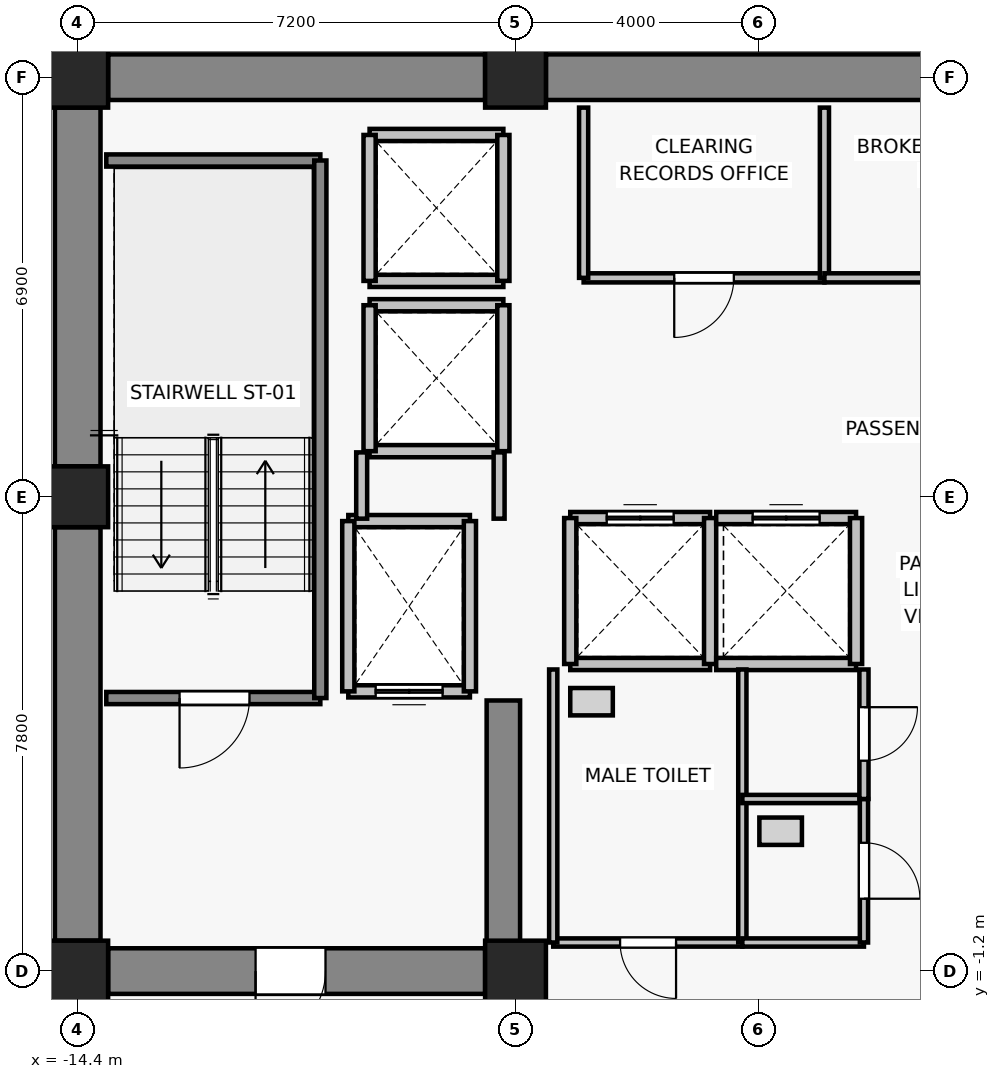
"""IFC4 building model, lengths in metres.
Left out: names, types, materials, properties, quantities, classifications, styles, units other than length and angle.
Written with IfcOpenShell. Run it as: python <this file> out.ifc"""

import sys

from ifc_helpers import new_model, si_unit, direction, frame, frame_2d, origin, origin_2d, place, context, subcontext, project, spatial, rectangle, extrude, source, transform, mapped, element, fill, save


model = new_model("IFC4")
c1 = context("Model", 3, precision=1e-05, world=origin(), true_north=direction((0.0, 1.0)))
c2 = subcontext(c1, "Body", "Model", "MODEL_VIEW")
j1 = project(units=[si_unit("LENGTHUNIT", "METRE"), si_unit("PLANEANGLEUNIT", "RADIAN")], contexts=[c1])
p1 = place(None, origin())
s1 = spatial("IfcSite", under=j1, at=p1, CompositionType="ELEMENT")
p2 = place(p1, origin())
s2 = spatial("IfcBuilding", under=s1, at=p2, CompositionType="ELEMENT")
p3 = place(p2, frame((0.0, 0.0, 192.4)))
s3 = spatial("IfcBuildingStorey", under=s2, at=p3, CompositionType="ELEMENT", Elevation=192.4)
for number, where, z_axis, x_axis in (
    (1, (-14.4, -1.2, 0.0), (0.0, 0.0, 1.0), (1.0, 0.0, 0.0)),
    (2, (-7.2, -1.2, 0.0), (0.0, 0.0, 1.0), (1.0, 0.0, 0.0)),
    (3, (-14.4, 6.6, 0.0), (0.0, 0.0, 1.0), (1.0, 0.0, 0.0)),
    (4, (-14.4, 13.5, 0.0), (0.0, 0.0, 1.0), (1.0, 0.0, 0.0)),
    (5, (-7.2, 13.5, 0.0), (0.0, 0.0, 1.0), (1.0, 0.0, 0.0)),
):
    element("IfcColumn", number, at=place(p3, frame(where, z_axis=z_axis, x_axis=x_axis)), inside=s3, PredefinedType="COLUMN", context=c2, shape_type="SweptSolid", body=[
        extrude(rectangle(XDim=1.0, YDim=1.0, at=origin_2d()), origin(), (0.0, 0.0, 1.0), 3.3),
    ])
p4 = place(p3, frame((-13.9, 13.5, 0.0), z_axis=(0.0, 0.0, 1.0), x_axis=(1.0, 0.0, 0.0)))
e6 = element("IfcWall", 6, at=p4, inside=s3, PredefinedType="SHEAR", context=c2, shape_type="SweptSolid", body=[
    extrude(rectangle(XDim=6.2, YDim=0.75, at=frame_2d((3.1, 0.0))), origin(), (0.0, 0.0, 1.0), 3.075),
])
p5 = place(p3, frame((-6.7, 13.5, 0.0), z_axis=(0.0, 0.0, 1.0), x_axis=(1.0, 0.0, 0.0)))
e7 = element("IfcWall", 7, at=p5, inside=s3, PredefinedType="SHEAR", context=c2, shape_type="SweptSolid", body=[
    extrude(rectangle(XDim=13.4, YDim=0.75, at=frame_2d((6.7, 0.0))), origin(), (0.0, 0.0, 1.0), 3.075),
])
p6 = place(p3, frame((-14.4, -0.7, 0.0), z_axis=(0.0, 0.0, 1.0), x_axis=(0.0, 1.0, 0.0)))
e8 = element("IfcWall", 8, at=p6, inside=s3, PredefinedType="SHEAR", context=c2, shape_type="SweptSolid", body=[
    extrude(rectangle(XDim=6.8, YDim=0.75, at=frame_2d((3.4, 0.0))), origin(), (0.0, 0.0, 1.0), 3.075),
])
p7 = place(p3, frame((-14.4, 7.1, 0.0), z_axis=(0.0, 0.0, 1.0), x_axis=(0.0, 1.0, 0.0)))
e9 = element("IfcWall", 9, at=p7, inside=s3, PredefinedType="SHEAR", context=c2, shape_type="SweptSolid", body=[
    extrude(rectangle(XDim=5.9, YDim=0.75, at=frame_2d((2.95, 0.0))), origin(), (0.0, 0.0, 1.0), 3.075),
])
p8 = place(p3, frame((-7.7, -1.2, 0.0), z_axis=(0.0, 0.0, 1.0), x_axis=(-1.0, 0.0, 0.0)))
e10 = element("IfcWall", 10, at=p8, inside=s3, PredefinedType="SHEAR", context=c2, shape_type="SweptSolid", body=[
    extrude(rectangle(XDim=6.2, YDim=0.75, at=frame_2d((3.1, 0.0))), origin(), (0.0, 0.0, 1.0), 3.075),
])
p9 = place(p8, frame((2.625, 0.0, 0.0)))
e11 = element("IfcOpeningElement", 11, at=p9, cuts=e10, PredefinedType="OPENING", context=c2, shape_type="SweptSolid", body=[
    extrude(rectangle(XDim=1.15, YDim=2.15, at=frame_2d((0.575, 1.075))), frame((0.0, 0.385, 0.0), z_axis=(0.0, -1.0, 0.0), x_axis=(1.0, 0.0, 0.0)), (0.0, 0.0, 1.0), 0.77),
])
p10 = place(p3, frame((-7.4, -0.825, 0.0), z_axis=(0.0, 0.0, 1.0), x_axis=(0.0, 1.0, 0.0)))
e12 = element("IfcWall", 12, at=p10, inside=s3, PredefinedType="SHEAR", context=c2, shape_type="SweptSolid", body=[
    extrude(rectangle(XDim=4.075, YDim=0.55, at=frame_2d((2.038, 0.0))), origin(), (0.0, 0.0, 1.0), 3.075),
])
p11 = place(p3, frame((-7.95, 3.4, 0.0), z_axis=(0.0, 0.0, 1.0), x_axis=(-1.0, 0.0, 0.0)))
e13 = element("IfcWall", 13, at=p11, inside=s3, PredefinedType="SOLIDWALL", context=c2, shape_type="SweptSolid", body=[
    extrude(rectangle(XDim=2.0, YDim=0.2, at=frame_2d((1.0, 0.0))), origin(), (0.0, 0.0, 1.0), 3.075),
])
p12 = place(p11, frame((0.45, 0.0, 0.0)))
e14 = element("IfcOpeningElement", 14, at=p12, cuts=e13, PredefinedType="OPENING", context=c2, shape_type="SweptSolid", body=[
    extrude(rectangle(XDim=1.1, YDim=2.2, at=frame_2d((0.55, 1.1))), frame((0.0, 0.11, 0.0), z_axis=(0.0, -1.0, 0.0), x_axis=(1.0, 0.0, 0.0)), (0.0, 0.0, 1.0), 0.22),
])
p13 = place(p3, frame((-9.95, 6.2, 0.0), z_axis=(0.0, 0.0, 1.0), x_axis=(1.0, 0.0, 0.0)))
e15 = element("IfcWall", 15, at=p13, inside=s3, PredefinedType="SOLIDWALL", context=c2, shape_type="SweptSolid", body=[
    extrude(rectangle(XDim=2.0, YDim=0.2, at=frame_2d((1.0, 0.0))), origin(), (0.0, 0.0, 1.0), 3.075),
])
for number, where, z_axis, x_axis in (
    (16, (-9.95, 3.4, 0.0), (0.0, 0.0, 1.0), (0.0, 1.0, 0.0)),
    (17, (-7.95, 6.2, 0.0), (0.0, 0.0, 1.0), (0.0, -1.0, 0.0)),
):
    element("IfcWall", number, at=place(p3, frame(where, z_axis=z_axis, x_axis=x_axis)), inside=s3, PredefinedType="SOLIDWALL", context=c2, shape_type="SweptSolid", body=[
        extrude(rectangle(XDim=2.8, YDim=0.2, at=frame_2d((1.4, 0.0))), origin(), (0.0, 0.0, 1.0), 3.075),
    ])
p14 = place(p3, frame((-4.0, 3.85, 0.0), z_axis=(0.0, 0.0, 1.0), x_axis=(-1.0, 0.0, 0.0)))
e18 = element("IfcWall", 18, at=p14, inside=s3, PredefinedType="SOLIDWALL", context=c2, shape_type="SweptSolid", body=[
    extrude(rectangle(XDim=2.3, YDim=0.2, at=frame_2d((1.15, 0.0))), origin(), (0.0, 0.0, 1.0), 3.075),
])
p15 = place(p3, frame((-6.3, 6.25, 0.0), z_axis=(0.0, 0.0, 1.0), x_axis=(1.0, 0.0, 0.0)))
e19 = element("IfcWall", 19, at=p15, inside=s3, PredefinedType="SOLIDWALL", context=c2, shape_type="SweptSolid", body=[
    extrude(rectangle(XDim=2.3, YDim=0.2, at=frame_2d((1.15, 0.0))), origin(), (0.0, 0.0, 1.0), 3.075),
])
p16 = place(p15, frame((0.6, 0.0, 0.0)))
e20 = element("IfcOpeningElement", 20, at=p16, cuts=e19, PredefinedType="OPENING", context=c2, shape_type="SweptSolid", body=[
    extrude(rectangle(XDim=1.1, YDim=2.2, at=frame_2d((0.55, 1.1))), frame((0.0, 0.11, 0.0), z_axis=(0.0, -1.0, 0.0), x_axis=(1.0, 0.0, 0.0)), (0.0, 0.0, 1.0), 0.22),
])
for number, where, z_axis, x_axis in (
    (21, (-6.3, 3.85, 0.0), (0.0, 0.0, 1.0), (0.0, 1.0, 0.0)),
    (22, (-4.0, 6.25, 0.0), (0.0, 0.0, 1.0), (0.0, -1.0, 0.0)),
):
    element("IfcWall", number, at=place(p3, frame(where, z_axis=z_axis, x_axis=x_axis)), inside=s3, PredefinedType="SOLIDWALL", context=c2, shape_type="SweptSolid", body=[
        extrude(rectangle(XDim=2.4, YDim=0.2, at=frame_2d((1.2, 0.0))), origin(), (0.0, 0.0, 1.0), 3.075),
    ])
p17 = place(p3, frame((-1.6, 3.85, 0.0), z_axis=(0.0, 0.0, 1.0), x_axis=(-1.0, 0.0, 0.0)))
e23 = element("IfcWall", 23, at=p17, inside=s3, PredefinedType="SOLIDWALL", context=c2, shape_type="SweptSolid", body=[
    extrude(rectangle(XDim=2.3, YDim=0.2, at=frame_2d((1.15, 0.0))), origin(), (0.0, 0.0, 1.0), 3.075),
])
p18 = place(p3, frame((-3.9, 6.25, 0.0), z_axis=(0.0, 0.0, 1.0), x_axis=(1.0, 0.0, 0.0)))
e24 = element("IfcWall", 24, at=p18, inside=s3, PredefinedType="SOLIDWALL", context=c2, shape_type="SweptSolid", body=[
    extrude(rectangle(XDim=2.3, YDim=0.2, at=frame_2d((1.15, 0.0))), origin(), (0.0, 0.0, 1.0), 3.075),
])
p19 = place(p18, frame((0.6, 0.0, 0.0)))
e25 = element("IfcOpeningElement", 25, at=p19, cuts=e24, PredefinedType="OPENING", context=c2, shape_type="SweptSolid", body=[
    extrude(rectangle(XDim=1.1, YDim=2.2, at=frame_2d((0.55, 1.1))), frame((0.0, 0.11, 0.0), z_axis=(0.0, -1.0, 0.0), x_axis=(1.0, 0.0, 0.0)), (0.0, 0.0, 1.0), 0.22),
])
p20 = place(p3, frame((-1.6, 6.25, 0.0), z_axis=(0.0, 0.0, 1.0), x_axis=(0.0, -1.0, 0.0)))
e26 = element("IfcWall", 26, at=p20, inside=s3, PredefinedType="SOLIDWALL", context=c2, shape_type="SweptSolid", body=[
    extrude(rectangle(XDim=2.4, YDim=0.2, at=frame_2d((1.2, 0.0))), origin(), (0.0, 0.0, 1.0), 3.075),
])
for number, where, z_axis, x_axis in (
    (27, (-7.4, 7.35, 0.0), (0.0, 0.0, 1.0), (-1.0, 0.0, 0.0)),
    (28, (-9.6, 9.75, 0.0), (0.0, 0.0, 1.0), (1.0, 0.0, 0.0)),
):
    element("IfcWall", number, at=place(p3, frame(where, z_axis=z_axis, x_axis=x_axis)), inside=s3, PredefinedType="SOLIDWALL", context=c2, shape_type="SweptSolid", body=[
        extrude(rectangle(XDim=2.2, YDim=0.2, at=frame_2d((1.1, 0.0))), origin(), (0.0, 0.0, 1.0), 2.565),
    ])
p21 = place(p3, frame((-9.6, 7.35, 0.0), z_axis=(0.0, 0.0, 1.0), x_axis=(0.0, 1.0, 0.0)))
e29 = element("IfcWall", 29, at=p21, inside=s3, PredefinedType="SOLIDWALL", context=c2, shape_type="SweptSolid", body=[
    extrude(rectangle(XDim=2.4, YDim=0.2, at=frame_2d((1.2, 0.0))), origin(), (0.0, 0.0, 1.0), 3.075),
])
p22 = place(p3, frame((-7.4, 9.75, 0.0), z_axis=(0.0, 0.0, 1.0), x_axis=(0.0, -1.0, 0.0)))
e30 = element("IfcWall", 30, at=p22, inside=s3, PredefinedType="SOLIDWALL", context=c2, shape_type="SweptSolid", body=[
    extrude(rectangle(XDim=2.4, YDim=0.2, at=frame_2d((1.2, 0.0))), origin(), (0.0, 0.0, 1.0), 2.565),
])
for number, where, z_axis, x_axis in (
    (31, (-7.4, 10.15, 0.0), (0.0, 0.0, 1.0), (-1.0, 0.0, 0.0)),
    (32, (-9.6, 12.55, 0.0), (0.0, 0.0, 1.0), (1.0, 0.0, 0.0)),
):
    element("IfcWall", number, at=place(p3, frame(where, z_axis=z_axis, x_axis=x_axis)), inside=s3, PredefinedType="SOLIDWALL", context=c2, shape_type="SweptSolid", body=[
        extrude(rectangle(XDim=2.2, YDim=0.2, at=frame_2d((1.1, 0.0))), origin(), (0.0, 0.0, 1.0), 2.565),
    ])
p23 = place(p3, frame((-9.6, 10.15, 0.0), z_axis=(0.0, 0.0, 1.0), x_axis=(0.0, 1.0, 0.0)))
e33 = element("IfcWall", 33, at=p23, inside=s3, PredefinedType="SOLIDWALL", context=c2, shape_type="SweptSolid", body=[
    extrude(rectangle(XDim=2.4, YDim=0.2, at=frame_2d((1.2, 0.0))), origin(), (0.0, 0.0, 1.0), 3.075),
])
p24 = place(p3, frame((-7.4, 12.55, 0.0), z_axis=(0.0, 0.0, 1.0), x_axis=(0.0, -1.0, 0.0)))
e34 = element("IfcWall", 34, at=p24, inside=s3, PredefinedType="SOLIDWALL", context=c2, shape_type="SweptSolid", body=[
    extrude(rectangle(XDim=2.4, YDim=0.2, at=frame_2d((1.2, 0.0))), origin(), (0.0, 0.0, 1.0), 2.565),
])
p25 = place(p3, frame((-10.41, 3.29, 0.0), z_axis=(0.0, 0.0, 1.0), x_axis=(-1.0, 0.0, 0.0)))
e35 = element("IfcWall", 35, at=p25, inside=s3, PredefinedType="SOLIDWALL", context=c2, shape_type="SweptSolid", body=[
    extrude(rectangle(XDim=3.52, YDim=0.2, at=frame_2d((1.76, 0.0))), origin(), (0.0, 0.0, 1.0), 3.075),
])
p26 = place(p25, frame((1.165, 0.0, 0.0)))
e36 = element("IfcOpeningElement", 36, at=p26, cuts=e35, PredefinedType="OPENING", context=c2, shape_type="SweptSolid", body=[
    extrude(rectangle(XDim=1.15, YDim=2.15, at=frame_2d((0.575, 1.075))), frame((0.0, 0.11, 0.0), z_axis=(0.0, -1.0, 0.0), x_axis=(1.0, 0.0, 0.0)), (0.0, 0.0, 1.0), 0.22),
])
p27 = place(p3, frame((-13.93, 12.13, 0.0), z_axis=(0.0, 0.0, 1.0), x_axis=(1.0, 0.0, 0.0)))
e37 = element("IfcWall", 37, at=p27, inside=s3, PredefinedType="SOLIDWALL", context=c2, shape_type="SweptSolid", body=[
    extrude(rectangle(XDim=3.52, YDim=0.2, at=frame_2d((1.76, 0.0))), origin(), (0.0, 0.0, 1.0), 3.075),
])
p28 = place(p3, frame((-10.41, 12.13, 0.0), z_axis=(0.0, 0.0, 1.0), x_axis=(0.0, -1.0, 0.0)))
e38 = element("IfcWall", 38, at=p28, inside=s3, PredefinedType="SOLIDWALL", context=c2, shape_type="SweptSolid", body=[
    extrude(rectangle(XDim=8.84, YDim=0.2, at=frame_2d((4.42, 0.0))), origin(), (0.0, 0.0, 1.0), 3.075),
])
p29 = place(p3, frame((-9.73, 6.24, 0.0), z_axis=(0.0, 0.0, 1.0), x_axis=(0.0, 1.0, 0.0)))
e39 = element("IfcWall", 39, at=p29, inside=s3, PredefinedType="PARTITIONING", context=c2, shape_type="SweptSolid", body=[
    extrude(rectangle(XDim=1.09, YDim=0.18, at=frame_2d((0.545, 0.0))), origin(), (0.0, 0.0, 1.0), 3.075),
])
p30 = place(p3, frame((-7.47, 7.33, 0.0), z_axis=(0.0, 0.0, 1.0), x_axis=(0.0, -1.0, 0.0)))
e40 = element("IfcWall", 40, at=p30, inside=s3, PredefinedType="PARTITIONING", context=c2, shape_type="SweptSolid", body=[
    extrude(rectangle(XDim=1.09, YDim=0.18, at=frame_2d((0.545, 0.0))), origin(), (0.0, 0.0, 1.0), 2.565),
])
p31 = place(p3, frame((-2.12, 10.2, 0.0), z_axis=(0.0, 0.0, 1.0), x_axis=(-1.0, 0.0, 0.0)))
e41 = element("IfcWall", 41, at=p31, inside=s3, PredefinedType="PARTITIONING", context=c2, shape_type="SweptSolid", body=[
    extrude(rectangle(XDim=3.96, YDim=0.15, at=frame_2d((1.98, 0.0))), origin(), (0.0, 0.0, 1.0), 3.075),
])
p32 = place(p31, frame((1.49, 0.0, 0.0)))
e42 = element("IfcOpeningElement", 42, at=p32, cuts=e41, PredefinedType="OPENING", context=c2, shape_type="SweptSolid", body=[
    extrude(rectangle(XDim=0.98, YDim=2.15, at=frame_2d((0.49, 1.075))), frame((0.0, 0.085, 0.0), z_axis=(0.0, -1.0, 0.0), x_axis=(1.0, 0.0, 0.0)), (0.0, 0.0, 1.0), 0.17),
])
for number, where, z_axis, x_axis in (
    (43, (-6.08, 10.2, 0.0), (0.0, 0.0, 1.0), (0.0, 1.0, 0.0)),
    (44, (-2.12, 13.0, 0.0), (0.0, 0.0, 1.0), (0.0, -1.0, 0.0)),
):
    element("IfcWall", number, at=place(p3, frame(where, z_axis=z_axis, x_axis=x_axis)), inside=s3, PredefinedType="PARTITIONING", context=c2, shape_type="SweptSolid", body=[
        extrude(rectangle(XDim=2.8, YDim=0.15, at=frame_2d((1.4, 0.0))), origin(), (0.0, 0.0, 1.0), 3.075),
    ])
p33 = place(p3, frame((2.04, 10.2, 0.0), z_axis=(0.0, 0.0, 1.0), x_axis=(-1.0, 0.0, 0.0)))
e45 = element("IfcWall", 45, at=p33, inside=s3, PredefinedType="PARTITIONING", context=c2, shape_type="SweptSolid", body=[
    extrude(rectangle(XDim=4.16, YDim=0.15, at=frame_2d((2.08, 0.0))), origin(), (0.0, 0.0, 1.0), 3.075),
])
p34 = place(p33, frame((1.55, 0.0, 0.0)))
e46 = element("IfcOpeningElement", 46, at=p34, cuts=e45, PredefinedType="OPENING", context=c2, shape_type="SweptSolid", body=[
    extrude(rectangle(XDim=0.98, YDim=2.15, at=frame_2d((0.49, 1.075))), frame((0.0, 0.085, 0.0), z_axis=(0.0, -1.0, 0.0), x_axis=(1.0, 0.0, 0.0)), (0.0, 0.0, 1.0), 0.17),
])
p35 = place(p3, frame((-3.47, -0.73, 0.0), z_axis=(0.0, 0.0, 1.0), x_axis=(-1.0, 0.0, 0.0)))
e47 = element("IfcWall", 47, at=p35, inside=s3, PredefinedType="PARTITIONING", context=c2, shape_type="SweptSolid", body=[
    extrude(rectangle(XDim=3.11, YDim=0.135, at=frame_2d((1.555, 0.0))), origin(), (0.0, 0.0, 1.0), 3.075),
])
p36 = place(p35, frame((1.09, 0.0, 0.0)))
e48 = element("IfcOpeningElement", 48, at=p36, cuts=e47, PredefinedType="OPENING", context=c2, shape_type="SweptSolid", body=[
    extrude(rectangle(XDim=0.92, YDim=2.1, at=frame_2d((0.46, 1.05))), frame((0.0, 0.077, 0.0), z_axis=(0.0, -1.0, 0.0), x_axis=(1.0, 0.0, 0.0)), (0.0, 0.0, 1.0), 0.155),
])
for number, where, z_axis, x_axis in (
    (49, (-6.58, -0.73, 0.0), (0.0, 0.0, 1.0), (0.0, 1.0, 0.0)),
    (50, (-3.47, 3.76, 0.0), (0.0, 0.0, 1.0), (0.0, -1.0, 0.0)),
):
    element("IfcWall", number, at=place(p3, frame(where, z_axis=z_axis, x_axis=x_axis)), inside=s3, PredefinedType="PARTITIONING", context=c2, shape_type="SweptSolid", body=[
        extrude(rectangle(XDim=4.49, YDim=0.135, at=frame_2d((2.245, 0.0))), origin(), (0.0, 0.0, 1.0), 3.075),
    ])
for number, where, z_axis, x_axis in (
    (51, (-1.47, -0.73, 0.0), (0.0, 0.0, 1.0), (-1.0, 0.0, 0.0)),
    (52, (-3.47, 1.63, 0.0), (0.0, 0.0, 1.0), (1.0, 0.0, 0.0)),
):
    element("IfcWall", number, at=place(p3, frame(where, z_axis=z_axis, x_axis=x_axis)), inside=s3, PredefinedType="PARTITIONING", context=c2, shape_type="SweptSolid", body=[
        extrude(rectangle(XDim=2.0, YDim=0.135, at=frame_2d((1.0, 0.0))), origin(), (0.0, 0.0, 1.0), 3.075),
    ])
p37 = place(p3, frame((-1.47, 1.63, 0.0), z_axis=(0.0, 0.0, 1.0), x_axis=(0.0, -1.0, 0.0)))
e53 = element("IfcWall", 53, at=p37, inside=s3, PredefinedType="PARTITIONING", context=c2, shape_type="SweptSolid", body=[
    extrude(rectangle(XDim=2.36, YDim=0.135, at=frame_2d((1.18, 0.0))), origin(), (0.0, 0.0, 1.0), 3.075),
])
p38 = place(p37, frame((0.72, 0.0, 0.0)))
e54 = element("IfcOpeningElement", 54, at=p38, cuts=e53, PredefinedType="OPENING", context=c2, shape_type="SweptSolid", body=[
    extrude(rectangle(XDim=0.92, YDim=2.1, at=frame_2d((0.46, 1.05))), frame((0.0, 0.077, 0.0), z_axis=(0.0, -1.0, 0.0), x_axis=(1.0, 0.0, 0.0)), (0.0, 0.0, 1.0), 0.155),
])
p39 = place(p3, frame((-1.47, 3.76, 0.0), z_axis=(0.0, 0.0, 1.0), x_axis=(0.0, -1.0, 0.0)))
e55 = element("IfcWall", 55, at=p39, inside=s3, PredefinedType="PARTITIONING", context=c2, shape_type="SweptSolid", body=[
    extrude(rectangle(XDim=2.13, YDim=0.15, at=frame_2d((1.065, 0.0))), origin(), (0.0, 0.0, 1.0), 3.075),
])
p40 = place(p39, frame((0.62, 0.0, 0.0)))
e56 = element("IfcOpeningElement", 56, at=p40, cuts=e55, PredefinedType="OPENING", context=c2, shape_type="SweptSolid", body=[
    extrude(rectangle(XDim=0.88, YDim=2.1, at=frame_2d((0.44, 1.05))), frame((0.0, 0.085, 0.0), z_axis=(0.0, -1.0, 0.0), x_axis=(1.0, 0.0, 0.0)), (0.0, 0.0, 1.0), 0.17),
])
m1 = source(origin(), c2, "Body", "SweptSolid", [
    extrude(rectangle(XDim=1.1, YDim=2.2, at=frame_2d((0.55, 1.1))), frame((0.0, 0.025, 0.0), z_axis=(0.0, -1.0, 0.0), x_axis=(1.0, 0.0, 0.0)), (0.0, 0.0, 1.0), 0.05),
])
p41 = place(p12, origin())
e57 = element("IfcDoor", 57, at=p41, inside=s3, OperationType="DOUBLE_DOOR_SLIDING", PredefinedType="DOOR", context=c2, shape_type="MappedRepresentation", body=[
    mapped(m1, transform((0.0, 0.0, 0.0), x_axis=(1.0, 0.0, 0.0), y_axis=(0.0, 1.0, 0.0), z_axis=(0.0, 0.0, 1.0), scale=1.0)),
])
fill(e14, e57)
p42 = place(p16, origin())
e58 = element("IfcDoor", 58, at=p42, inside=s3, OperationType="DOUBLE_DOOR_SLIDING", PredefinedType="DOOR", context=c2, shape_type="MappedRepresentation", body=[
    mapped(m1, transform((0.0, 0.0, 0.0), x_axis=(1.0, 0.0, 0.0), y_axis=(0.0, 1.0, 0.0), z_axis=(0.0, 0.0, 1.0), scale=1.0)),
])
fill(e20, e58)
p43 = place(p19, origin())
e59 = element("IfcDoor", 59, at=p43, inside=s3, OperationType="DOUBLE_DOOR_SLIDING", PredefinedType="DOOR", context=c2, shape_type="MappedRepresentation", body=[
    mapped(m1, transform((0.0, 0.0, 0.0), x_axis=(1.0, 0.0, 0.0), y_axis=(0.0, 1.0, 0.0), z_axis=(0.0, 0.0, 1.0), scale=1.0)),
])
fill(e25, e59)
m2 = source(origin(), c2, "Body", "SweptSolid", [
    extrude(rectangle(XDim=1.15, YDim=2.15, at=frame_2d((0.575, 1.075))), frame((0.0, 0.025, 0.0), z_axis=(0.0, -1.0, 0.0), x_axis=(1.0, 0.0, 0.0)), (0.0, 0.0, 1.0), 0.05),
])
p44 = place(p26, origin())
e60 = element("IfcDoor", 60, at=p44, inside=s3, OperationType="SINGLE_SWING_RIGHT", PredefinedType="DOOR", context=c2, shape_type="MappedRepresentation", body=[
    mapped(m2, transform((0.0, 0.0, 0.0), x_axis=(1.0, 0.0, 0.0), y_axis=(0.0, 1.0, 0.0), z_axis=(0.0, 0.0, 1.0), scale=1.0)),
])
fill(e36, e60)
p45 = place(p9, origin())
e61 = element("IfcDoor", 61, at=p45, inside=s3, OperationType="SINGLE_SWING_RIGHT", PredefinedType="DOOR", context=c2, shape_type="MappedRepresentation", body=[
    mapped(m2, transform((0.0, 0.0, 0.0), x_axis=(1.0, 0.0, 0.0), y_axis=(0.0, 1.0, 0.0), z_axis=(0.0, 0.0, 1.0), scale=1.0)),
])
fill(e11, e61)
m3 = source(origin(), c2, "Body", "SweptSolid", [
    extrude(rectangle(XDim=0.98, YDim=2.15, at=frame_2d((0.49, 1.075))), frame((0.0, 0.025, 0.0), z_axis=(0.0, -1.0, 0.0), x_axis=(1.0, 0.0, 0.0)), (0.0, 0.0, 1.0), 0.05),
])
p46 = place(p32, origin())
e62 = element("IfcDoor", 62, at=p46, inside=s3, OperationType="SINGLE_SWING_RIGHT", PredefinedType="DOOR", context=c2, shape_type="MappedRepresentation", body=[
    mapped(m3, transform((0.0, 0.0, 0.0), x_axis=(1.0, 0.0, 0.0), y_axis=(0.0, 1.0, 0.0), z_axis=(0.0, 0.0, 1.0), scale=1.0)),
])
fill(e42, e62)
m4 = source(origin(), c2, "Body", "SweptSolid", [
    extrude(rectangle(XDim=0.92, YDim=2.1, at=frame_2d((0.46, 1.05))), frame((0.0, 0.025, 0.0), z_axis=(0.0, -1.0, 0.0), x_axis=(1.0, 0.0, 0.0)), (0.0, 0.0, 1.0), 0.05),
])
p47 = place(p36, origin())
e63 = element("IfcDoor", 63, at=p47, inside=s3, OperationType="SINGLE_SWING_LEFT", PredefinedType="DOOR", context=c2, shape_type="MappedRepresentation", body=[
    mapped(m4, transform((0.0, 0.0, 0.0), x_axis=(1.0, 0.0, 0.0), y_axis=(0.0, 1.0, 0.0), z_axis=(0.0, 0.0, 1.0), scale=1.0)),
])
fill(e48, e63)
p48 = place(p38, origin())
e64 = element("IfcDoor", 64, at=p48, inside=s3, OperationType="SINGLE_SWING_RIGHT", PredefinedType="DOOR", context=c2, shape_type="MappedRepresentation", body=[
    mapped(m4, transform((0.0, 0.0, 0.0), x_axis=(1.0, 0.0, 0.0), y_axis=(0.0, 1.0, 0.0), z_axis=(0.0, 0.0, 1.0), scale=1.0)),
])
fill(e54, e64)
m5 = source(origin(), c2, "Body", "SweptSolid", [
    extrude(rectangle(XDim=0.88, YDim=2.1, at=frame_2d((0.44, 1.05))), frame((0.0, 0.025, 0.0), z_axis=(0.0, -1.0, 0.0), x_axis=(1.0, 0.0, 0.0)), (0.0, 0.0, 1.0), 0.05),
])
p49 = place(p40, origin())
e65 = element("IfcDoor", 65, at=p49, inside=s3, OperationType="SINGLE_SWING_LEFT", PredefinedType="DOOR", context=c2, shape_type="MappedRepresentation", body=[
    mapped(m5, transform((0.0, 0.0, 0.0), x_axis=(1.0, 0.0, 0.0), y_axis=(0.0, 1.0, 0.0), z_axis=(0.0, 0.0, 1.0), scale=1.0)),
])
fill(e56, e65)
save(model, sys.argv[1])
